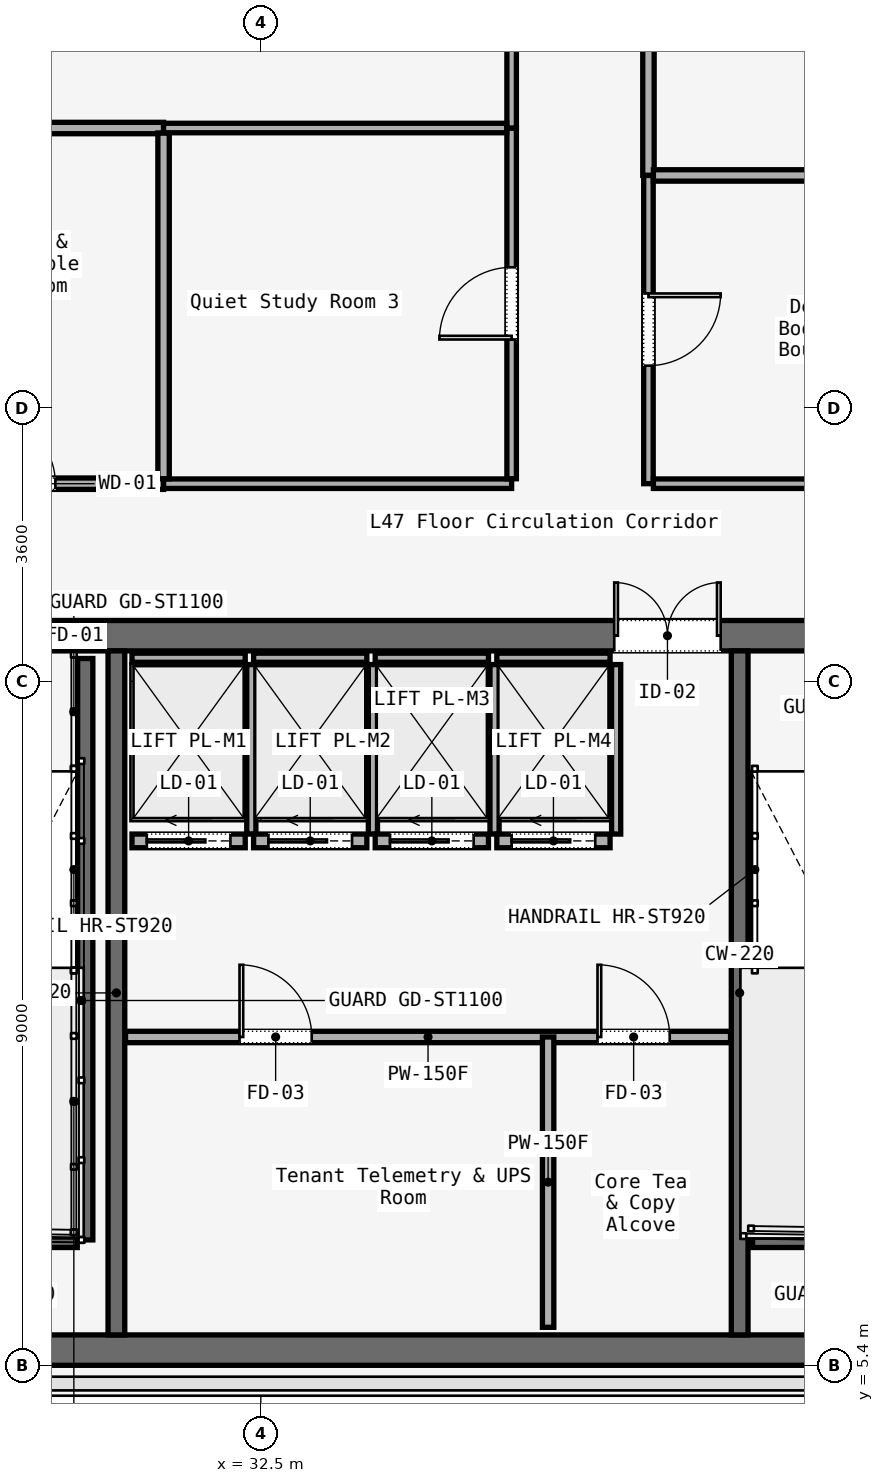
"""IFC4 building model, lengths in metres.
Left out: names, types, materials, properties, quantities, classifications, styles, units other than length and angle.
Written with IfcOpenShell. Run it as: python <this file> out.ifc"""

import sys

from ifc_helpers import new_model, si_unit, direction, frame, frame_2d, origin, place, context, subcontext, project, spatial, rectangle, extrude, element, fill, save


model = new_model("IFC4")
c1 = context("Model", 3, precision=1e-05, world=origin(), true_north=direction((0.0, 1.0)))
c2 = subcontext(c1, "Body", "Model", "MODEL_VIEW")
j1 = project(units=[si_unit("LENGTHUNIT", "METRE"), si_unit("PLANEANGLEUNIT", "RADIAN")], contexts=[c1])
p1 = place(None, origin())
s1 = spatial("IfcSite", under=j1, at=p1, CompositionType="ELEMENT")
p2 = place(p1, origin())
s2 = spatial("IfcBuilding", under=s1, at=p2, CompositionType="ELEMENT")
p3 = place(p2, frame((0.0, 0.0, 195.4)))
s3 = spatial("IfcBuildingStorey", under=s2, at=p3, CompositionType="ELEMENT", Elevation=195.4)
p4 = place(p3, frame((26.45, 15.0, 0.0), z_axis=(0.0, 0.0, 1.0), x_axis=(1.0, 0.0, 0.0)))
e1 = element("IfcWall", 1, at=p4, inside=s3, PredefinedType="SOLIDWALL", context=c2, shape_type="SweptSolid", body=[
    extrude(rectangle(XDim=31.1, YDim=0.4, at=frame_2d((15.55, 0.0))), origin(), (0.0, 0.0, 1.0), 3.58),
])
p5 = place(p4, frame((1.65, 0.0, 0.0)))
e2 = element("IfcOpeningElement", 2, at=p5, cuts=e1, PredefinedType="OPENING", context=c2, shape_type="SweptSolid", body=[
    extrude(rectangle(XDim=1.1, YDim=2.2, at=frame_2d((0.55, 1.1))), frame((0.0, 0.2, 0.0), z_axis=(0.0, -1.0, 0.0), x_axis=(1.0, 0.0, 0.0)), (0.0, 0.0, 1.0), 0.4),
])
p6 = place(p4, frame((13.65, 0.0, 0.0)))
e3 = element("IfcOpeningElement", 3, at=p6, cuts=e1, PredefinedType="OPENING", context=c2, shape_type="SweptSolid", body=[
    extrude(rectangle(XDim=1.1, YDim=2.2, at=frame_2d((0.55, 1.1))), frame((0.0, 0.2, 0.0), z_axis=(0.0, -1.0, 0.0), x_axis=(1.0, 0.0, 0.0)), (0.0, 0.0, 1.0), 0.4),
])
p7 = place(p4, frame((25.55, 0.0, 0.0)))
e4 = element("IfcOpeningElement", 4, at=p7, cuts=e1, PredefinedType="OPENING", context=c2, shape_type="SweptSolid", body=[
    extrude(rectangle(XDim=1.1, YDim=2.2, at=frame_2d((0.55, 1.1))), frame((0.0, 0.2, 0.0), z_axis=(0.0, -1.0, 0.0), x_axis=(1.0, 0.0, 0.0)), (0.0, 0.0, 1.0), 0.4),
])
p8 = place(p4, frame((10.7, 0.0, 0.0)))
e5 = element("IfcOpeningElement", 5, at=p8, cuts=e1, PredefinedType="OPENING", context=c2, shape_type="SweptSolid", body=[
    extrude(rectangle(XDim=1.4, YDim=2.2, at=frame_2d((0.7, 1.1))), frame((0.0, 0.2, 0.0), z_axis=(0.0, -1.0, 0.0), x_axis=(1.0, 0.0, 0.0)), (0.0, 0.0, 1.0), 0.4),
])
p9 = place(p4, frame((19.35, 0.0, 0.0)))
e6 = element("IfcOpeningElement", 6, at=p9, cuts=e1, PredefinedType="OPENING", context=c2, shape_type="SweptSolid", body=[
    extrude(rectangle(XDim=1.1, YDim=2.2, at=frame_2d((0.55, 1.1))), frame((0.0, 0.2, 0.0), z_axis=(0.0, -1.0, 0.0), x_axis=(1.0, 0.0, 0.0)), (0.0, 0.0, 1.0), 0.4),
])
p10 = place(p4, frame((21.4, 0.0, 0.0)))
e7 = element("IfcOpeningElement", 7, at=p10, cuts=e1, PredefinedType="OPENING", context=c2, shape_type="SweptSolid", body=[
    extrude(rectangle(XDim=0.9, YDim=2.1, at=frame_2d((0.45, 1.05))), frame((0.0, 0.2, 0.0), z_axis=(0.0, -1.0, 0.0), x_axis=(1.0, 0.0, 0.0)), (0.0, 0.0, 1.0), 0.4),
])
p11 = place(p4, frame((23.35, 0.0, 0.0)))
e8 = element("IfcOpeningElement", 8, at=p11, cuts=e1, PredefinedType="OPENING", context=c2, shape_type="SweptSolid", body=[
    extrude(rectangle(XDim=1.3, YDim=2.3, at=frame_2d((0.65, 1.15))), frame((0.0, 0.2, 0.0), z_axis=(0.0, -1.0, 0.0), x_axis=(1.0, 0.0, 0.0)), (0.0, 0.0, 1.0), 0.4),
])
p12 = place(p3, frame((26.45, 5.6, 0.0), z_axis=(0.0, 0.0, 1.0), x_axis=(1.0, 0.0, 0.0)))
e9 = element("IfcWall", 9, at=p12, inside=s3, PredefinedType="SOLIDWALL", context=c2, shape_type="SweptSolid", body=[
    extrude(rectangle(XDim=31.1, YDim=0.4, at=frame_2d((15.55, 0.0))), origin(), (0.0, 0.0, 1.0), 3.58),
])
for number, where, z_axis, x_axis in (
    (10, (30.6, 5.8, 0.0), (0.0, 0.0, 1.0), (0.0, 1.0, 0.0)),
    (11, (38.8, 5.8, 0.0), (0.0, 0.0, 1.0), (0.0, 1.0, 0.0)),
):
    element("IfcWall", number, at=place(p3, frame(where, z_axis=z_axis, x_axis=x_axis)), inside=s3, PredefinedType="SOLIDWALL", context=c2, shape_type="SweptSolid", body=[
        extrude(rectangle(XDim=9.0, YDim=0.22, at=frame_2d((4.5, 0.0))), origin(), (0.0, 0.0, 1.0), 3.58),
    ])
p13 = place(p3, frame((30.19, 14.7, 0.0), z_axis=(0.0, 0.0, 1.0), x_axis=(0.0, -1.0, 0.0)))
e12 = element("IfcWall", 12, at=p13, inside=s3, PredefinedType="SOLIDWALL", context=c2, shape_type="SweptSolid", body=[
    extrude(rectangle(XDim=7.65, YDim=0.2, at=frame_2d((3.825, 0.0))), origin(), (0.0, 0.0, 1.0), 3.8),
])
for number, where, z_axis, x_axis in (
    (13, (26.97, 7.05, 0.0), (0.0, 0.0, 1.0), (1.0, 0.0, 0.0)),
    (14, (38.97, 7.05, 0.0), (0.0, 0.0, 1.0), (1.0, 0.0, 0.0)),
):
    element("IfcWall", number, at=place(p3, frame(where, z_axis=z_axis, x_axis=x_axis)), inside=s3, PredefinedType="SOLIDWALL", context=c2, shape_type="SweptSolid", body=[
        extrude(rectangle(XDim=3.115, YDim=0.2, at=frame_2d((1.558, 0.0))), origin(), (0.0, 0.0, 1.0), 3.8),
    ])
p14 = place(p3, frame((30.72, 9.72, 0.0), z_axis=(0.0, 0.0, 1.0), x_axis=(1.0, 0.0, 0.0)))
e15 = element("IfcWall", 15, at=p14, inside=s3, PredefinedType="PARTITIONING", context=c2, shape_type="SweptSolid", body=[
    extrude(rectangle(XDim=7.96, YDim=0.15, at=frame_2d((3.98, 0.0))), origin(), (0.0, 0.0, 1.0), 3.01),
])
p15 = place(p14, frame((1.5, 0.0, 0.0)))
e16 = element("IfcOpeningElement", 16, at=p15, cuts=e15, PredefinedType="OPENING", context=c2, shape_type="SweptSolid", body=[
    extrude(rectangle(XDim=0.95, YDim=2.2, at=frame_2d((0.475, 1.1))), frame((0.0, 0.075, 0.0), z_axis=(0.0, -1.0, 0.0), x_axis=(1.0, 0.0, 0.0)), (0.0, 0.0, 1.0), 0.15),
])
p16 = place(p14, frame((6.21, 0.0, 0.0)))
e17 = element("IfcOpeningElement", 17, at=p16, cuts=e15, PredefinedType="OPENING", context=c2, shape_type="SweptSolid", body=[
    extrude(rectangle(XDim=0.95, YDim=2.2, at=frame_2d((0.475, 1.1))), frame((0.0, 0.075, 0.0), z_axis=(0.0, -1.0, 0.0), x_axis=(1.0, 0.0, 0.0)), (0.0, 0.0, 1.0), 0.15),
])
p17 = place(p3, frame((36.28, 5.9, 0.0), z_axis=(0.0, 0.0, 1.0), x_axis=(0.0, 1.0, 0.0)))
e18 = element("IfcWall", 18, at=p17, inside=s3, PredefinedType="PARTITIONING", context=c2, shape_type="SweptSolid", body=[
    extrude(rectangle(XDim=3.82, YDim=0.15, at=frame_2d((1.91, 0.0))), origin(), (0.0, 0.0, 1.0), 3.01),
])
p18 = place(p3, frame((30.805, 12.3, 0.0), z_axis=(0.0, 0.0, 1.0), x_axis=(1.0, 0.0, 0.0)))
e19 = element("IfcWall", 19, at=p18, inside=s3, PredefinedType="SOLIDWALL", context=c2, shape_type="SweptSolid", body=[
    extrude(rectangle(XDim=1.49, YDim=0.18, at=frame_2d((0.745, 0.0))), origin(), (0.0, 0.0, 1.0), 3.01),
])
p19 = place(p18, frame((0.195, 0.0, 0.0)))
e20 = element("IfcOpeningElement", 20, at=p19, cuts=e19, PredefinedType="OPENING", context=c2, shape_type="SweptSolid", body=[
    extrude(rectangle(XDim=1.1, YDim=2.2, at=frame_2d((0.55, 1.1))), frame((0.0, 0.09, 0.0), z_axis=(0.0, -1.0, 0.0), x_axis=(1.0, 0.0, 0.0)), (0.0, 0.0, 1.0), 0.18),
])
p20 = place(p3, frame((30.805, 14.71, 0.0), z_axis=(0.0, 0.0, 1.0), x_axis=(1.0, 0.0, 0.0)))
e21 = element("IfcWall", 21, at=p20, inside=s3, PredefinedType="SOLIDWALL", context=c2, shape_type="SweptSolid", body=[
    extrude(rectangle(XDim=1.49, YDim=0.12, at=frame_2d((0.745, 0.0))), origin(), (0.0, 0.0, 1.0), 3.01),
])
p21 = place(p3, frame((32.375, 12.39, 0.0), z_axis=(0.0, 0.0, 1.0), x_axis=(0.0, 1.0, 0.0)))
e22 = element("IfcWall", 22, at=p21, inside=s3, PredefinedType="SOLIDWALL", context=c2, shape_type="SweptSolid", body=[
    extrude(rectangle(XDim=2.23, YDim=0.12, at=frame_2d((1.115, 0.0))), origin(), (0.0, 0.0, 1.0), 3.01),
])
p22 = place(p3, frame((32.405, 12.3, 0.0), z_axis=(0.0, 0.0, 1.0), x_axis=(1.0, 0.0, 0.0)))
e23 = element("IfcWall", 23, at=p22, inside=s3, PredefinedType="SOLIDWALL", context=c2, shape_type="SweptSolid", body=[
    extrude(rectangle(XDim=1.49, YDim=0.18, at=frame_2d((0.745, 0.0))), origin(), (0.0, 0.0, 1.0), 3.01),
])
p23 = place(p22, frame((0.195, 0.0, 0.0)))
e24 = element("IfcOpeningElement", 24, at=p23, cuts=e23, PredefinedType="OPENING", context=c2, shape_type="SweptSolid", body=[
    extrude(rectangle(XDim=1.1, YDim=2.2, at=frame_2d((0.55, 1.1))), frame((0.0, 0.09, 0.0), z_axis=(0.0, -1.0, 0.0), x_axis=(1.0, 0.0, 0.0)), (0.0, 0.0, 1.0), 0.18),
])
p24 = place(p3, frame((32.405, 14.71, 0.0), z_axis=(0.0, 0.0, 1.0), x_axis=(1.0, 0.0, 0.0)))
e25 = element("IfcWall", 25, at=p24, inside=s3, PredefinedType="SOLIDWALL", context=c2, shape_type="SweptSolid", body=[
    extrude(rectangle(XDim=1.49, YDim=0.12, at=frame_2d((0.745, 0.0))), origin(), (0.0, 0.0, 1.0), 3.01),
])
p25 = place(p3, frame((33.975, 12.39, 0.0), z_axis=(0.0, 0.0, 1.0), x_axis=(0.0, 1.0, 0.0)))
e26 = element("IfcWall", 26, at=p25, inside=s3, PredefinedType="SOLIDWALL", context=c2, shape_type="SweptSolid", body=[
    extrude(rectangle(XDim=2.23, YDim=0.12, at=frame_2d((1.115, 0.0))), origin(), (0.0, 0.0, 1.0), 3.01),
])
p26 = place(p3, frame((34.005, 12.3, 0.0), z_axis=(0.0, 0.0, 1.0), x_axis=(1.0, 0.0, 0.0)))
e27 = element("IfcWall", 27, at=p26, inside=s3, PredefinedType="SOLIDWALL", context=c2, shape_type="SweptSolid", body=[
    extrude(rectangle(XDim=1.49, YDim=0.18, at=frame_2d((0.745, 0.0))), origin(), (0.0, 0.0, 1.0), 3.01),
])
p27 = place(p26, frame((0.195, 0.0, 0.0)))
e28 = element("IfcOpeningElement", 28, at=p27, cuts=e27, PredefinedType="OPENING", context=c2, shape_type="SweptSolid", body=[
    extrude(rectangle(XDim=1.1, YDim=2.2, at=frame_2d((0.55, 1.1))), frame((0.0, 0.09, 0.0), z_axis=(0.0, -1.0, 0.0), x_axis=(1.0, 0.0, 0.0)), (0.0, 0.0, 1.0), 0.18),
])
p28 = place(p3, frame((34.005, 14.71, 0.0), z_axis=(0.0, 0.0, 1.0), x_axis=(1.0, 0.0, 0.0)))
e29 = element("IfcWall", 29, at=p28, inside=s3, PredefinedType="SOLIDWALL", context=c2, shape_type="SweptSolid", body=[
    extrude(rectangle(XDim=1.49, YDim=0.12, at=frame_2d((0.745, 0.0))), origin(), (0.0, 0.0, 1.0), 3.01),
])
p29 = place(p3, frame((35.575, 12.39, 0.0), z_axis=(0.0, 0.0, 1.0), x_axis=(0.0, 1.0, 0.0)))
e30 = element("IfcWall", 30, at=p29, inside=s3, PredefinedType="SOLIDWALL", context=c2, shape_type="SweptSolid", body=[
    extrude(rectangle(XDim=2.23, YDim=0.12, at=frame_2d((1.115, 0.0))), origin(), (0.0, 0.0, 1.0), 3.01),
])
p30 = place(p3, frame((35.605, 12.3, 0.0), z_axis=(0.0, 0.0, 1.0), x_axis=(1.0, 0.0, 0.0)))
e31 = element("IfcWall", 31, at=p30, inside=s3, PredefinedType="SOLIDWALL", context=c2, shape_type="SweptSolid", body=[
    extrude(rectangle(XDim=1.49, YDim=0.18, at=frame_2d((0.745, 0.0))), origin(), (0.0, 0.0, 1.0), 3.01),
])
p31 = place(p30, frame((0.195, 0.0, 0.0)))
e32 = element("IfcOpeningElement", 32, at=p31, cuts=e31, PredefinedType="OPENING", context=c2, shape_type="SweptSolid", body=[
    extrude(rectangle(XDim=1.1, YDim=2.2, at=frame_2d((0.55, 1.1))), frame((0.0, 0.09, 0.0), z_axis=(0.0, -1.0, 0.0), x_axis=(1.0, 0.0, 0.0)), (0.0, 0.0, 1.0), 0.18),
])
p32 = place(p3, frame((35.605, 14.71, 0.0), z_axis=(0.0, 0.0, 1.0), x_axis=(1.0, 0.0, 0.0)))
e33 = element("IfcWall", 33, at=p32, inside=s3, PredefinedType="SOLIDWALL", context=c2, shape_type="SweptSolid", body=[
    extrude(rectangle(XDim=1.49, YDim=0.12, at=frame_2d((0.745, 0.0))), origin(), (0.0, 0.0, 1.0), 3.01),
])
p33 = place(p3, frame((37.175, 12.39, 0.0), z_axis=(0.0, 0.0, 1.0), x_axis=(0.0, 1.0, 0.0)))
e34 = element("IfcWall", 34, at=p33, inside=s3, PredefinedType="SOLIDWALL", context=c2, shape_type="SweptSolid", body=[
    extrude(rectangle(XDim=2.23, YDim=0.12, at=frame_2d((1.115, 0.0))), origin(), (0.0, 0.0, 1.0), 3.01),
])
p34 = place(p3, frame((27.474, 17.0, 0.0), z_axis=(0.0, 0.0, 1.0), x_axis=(1.0, 0.0, 0.0)))
e35 = element("IfcWall", 35, at=p34, inside=s3, PredefinedType="PARTITIONING", context=c2, shape_type="SweptSolid", body=[
    extrude(rectangle(XDim=3.747, YDim=0.15, at=frame_2d((1.874, 0.0))), origin(), (0.0, 0.0, 1.0), 3.01),
])
p35 = place(p34, frame((1.424, 0.0, 0.0)))
e36 = element("IfcOpeningElement", 36, at=p35, cuts=e35, PredefinedType="OPENING", context=c2, shape_type="SweptSolid", body=[
    extrude(rectangle(XDim=0.9, YDim=2.15, at=frame_2d((0.45, 1.075))), frame((0.0, 0.075, 0.0), z_axis=(0.0, -1.0, 0.0), x_axis=(1.0, 0.0, 0.0)), (0.0, 0.0, 1.0), 0.15),
])
p36 = place(p3, frame((31.22, 17.0, 0.0), z_axis=(0.0, 0.0, 1.0), x_axis=(1.0, 0.0, 0.0)))
e37 = element("IfcWall", 37, at=p36, inside=s3, PredefinedType="PARTITIONING", context=c2, shape_type="SweptSolid", body=[
    extrude(rectangle(XDim=4.58, YDim=0.125, at=frame_2d((2.29, 0.0))), origin(), (0.0, 0.0, 1.0), 3.01),
])
p37 = place(p3, frame((35.8, 17.065, 0.0), z_axis=(0.0, 0.0, 1.0), x_axis=(0.0, 1.0, 0.0)))
e38 = element("IfcWall", 38, at=p37, inside=s3, PredefinedType="PARTITIONING", context=c2, shape_type="SweptSolid", body=[
    extrude(rectangle(XDim=4.615, YDim=0.125, at=frame_2d((2.308, 0.0))), origin(), (0.0, 0.0, 1.0), 3.01),
])
p38 = place(p37, frame((1.833, 0.0, 0.0)))
e39 = element("IfcOpeningElement", 39, at=p38, cuts=e38, PredefinedType="OPENING", context=c2, shape_type="SweptSolid", body=[
    extrude(rectangle(XDim=0.95, YDim=2.2, at=frame_2d((0.475, 1.1))), frame((0.0, 0.062, 0.0), z_axis=(0.0, -1.0, 0.0), x_axis=(1.0, 0.0, 0.0)), (0.0, 0.0, 1.0), 0.125),
])
p39 = place(p3, frame((35.8, 21.68, 0.0), z_axis=(0.0, 0.0, 1.0), x_axis=(0.0, 1.0, 0.0)))
e40 = element("IfcWall", 40, at=p39, inside=s3, PredefinedType="PARTITIONING", context=c2, shape_type="SweptSolid", body=[
    extrude(rectangle(XDim=2.403, YDim=0.125, at=frame_2d((1.201, 0.0))), origin(), (0.0, 0.0, 1.0), 3.01),
])
p40 = place(p3, frame((37.6, 27.335, 0.0), z_axis=(0.0, 0.0, 1.0), x_axis=(0.0, -1.0, 0.0)))
e41 = element("IfcWall", 41, at=p40, inside=s3, PredefinedType="PARTITIONING", context=c2, shape_type="SweptSolid", body=[
    extrude(rectangle(XDim=6.279, YDim=0.15, at=frame_2d((3.14, 0.0))), origin(), (0.0, 0.0, 1.0), 3.01),
])
p41 = place(p40, frame((2.665, 0.0, 0.0)))
e42 = element("IfcOpeningElement", 42, at=p41, cuts=e41, PredefinedType="OPENING", context=c2, shape_type="SweptSolid", body=[
    extrude(rectangle(XDim=0.95, YDim=2.2, at=frame_2d((0.475, 1.1))), frame((0.0, 0.075, 0.0), z_axis=(0.0, -1.0, 0.0), x_axis=(1.0, 0.0, 0.0)), (0.0, 0.0, 1.0), 0.15),
])
p42 = place(p3, frame((37.6, 21.056, 0.0), z_axis=(0.0, 0.0, 1.0), x_axis=(0.0, -1.0, 0.0)))
e43 = element("IfcWall", 43, at=p42, inside=s3, PredefinedType="PARTITIONING", context=c2, shape_type="SweptSolid", body=[
    extrude(rectangle(XDim=4.056, YDim=0.125, at=frame_2d((2.028, 0.0))), origin(), (0.0, 0.0, 1.0), 3.01),
])
p43 = place(p42, frame((1.553, 0.0, 0.0)))
e44 = element("IfcOpeningElement", 44, at=p43, cuts=e43, PredefinedType="OPENING", context=c2, shape_type="SweptSolid", body=[
    extrude(rectangle(XDim=0.95, YDim=2.2, at=frame_2d((0.475, 1.1))), frame((0.0, 0.062, 0.0), z_axis=(0.0, -1.0, 0.0), x_axis=(1.0, 0.0, 0.0)), (0.0, 0.0, 1.0), 0.125),
])
p44 = place(p3, frame((37.665, 17.0, 0.0), z_axis=(0.0, 0.0, 1.0), x_axis=(1.0, 0.0, 0.0)))
e45 = element("IfcWall", 45, at=p44, inside=s3, PredefinedType="PARTITIONING", context=c2, shape_type="SweptSolid", body=[
    extrude(rectangle(XDim=3.445, YDim=0.125, at=frame_2d((1.723, 0.0))), origin(), (0.0, 0.0, 1.0), 3.01),
])
p45 = place(p3, frame((37.665, 21.056, 0.0), z_axis=(0.0, 0.0, 1.0), x_axis=(1.0, 0.0, 0.0)))
e46 = element("IfcWall", 46, at=p45, inside=s3, PredefinedType="PARTITIONING", context=c2, shape_type="SweptSolid", body=[
    extrude(rectangle(XDim=3.38, YDim=0.15, at=frame_2d((1.69, 0.0))), origin(), (0.0, 0.0, 1.0), 3.01),
])
p46 = place(p3, frame((27.539, 21.68, 0.0), z_axis=(0.0, 0.0, 1.0), x_axis=(1.0, 0.0, 0.0)))
e47 = element("IfcWall", 47, at=p46, inside=s3, PredefinedType="PARTITIONING", context=c2, shape_type="SweptSolid", body=[
    extrude(rectangle(XDim=3.682, YDim=0.15, at=frame_2d((1.841, 0.0))), origin(), (0.0, 0.0, 1.0), 3.01),
])
p47 = place(p3, frame((31.22, 21.615, 0.0), z_axis=(0.0, 0.0, 1.0), x_axis=(0.0, -1.0, 0.0)))
e48 = element("IfcWall", 48, at=p47, inside=s3, PredefinedType="PARTITIONING", context=c2, shape_type="SweptSolid", body=[
    extrude(rectangle(XDim=4.55, YDim=0.15, at=frame_2d((2.275, 0.0))), origin(), (0.0, 0.0, 1.0), 3.01),
])
p48 = place(p3, frame((31.22, 21.68, 0.0), z_axis=(0.0, 0.0, 1.0), x_axis=(1.0, 0.0, 0.0)))
e49 = element("IfcWall", 49, at=p48, inside=s3, PredefinedType="PARTITIONING", context=c2, shape_type="SweptSolid", body=[
    extrude(rectangle(XDim=4.515, YDim=0.125, at=frame_2d((2.257, 0.0))), origin(), (0.0, 0.0, 1.0), 3.01),
])
p49 = place(p8, origin())
e50 = element("IfcDoor", 50, at=p49, inside=s3, OperationType="DOUBLE_DOOR_SINGLE_SWING", PredefinedType="DOOR", context=c2, shape_type="SweptSolid", body=[
    extrude(rectangle(XDim=1.4, YDim=2.2, at=frame_2d((0.7, 1.1))), frame((0.0, 0.025, 0.0), z_axis=(0.0, -1.0, 0.0), x_axis=(1.0, 0.0, 0.0)), (0.0, 0.0, 1.0), 0.05),
])
fill(e5, e50)
p50 = place(p15, origin())
e51 = element("IfcDoor", 51, at=p50, inside=s3, OperationType="SINGLE_SWING_LEFT", PredefinedType="DOOR", context=c2, shape_type="SweptSolid", body=[
    extrude(rectangle(XDim=0.95, YDim=2.2, at=frame_2d((0.475, 1.1))), frame((0.0, 0.025, 0.0), z_axis=(0.0, -1.0, 0.0), x_axis=(1.0, 0.0, 0.0)), (0.0, 0.0, 1.0), 0.05),
])
fill(e16, e51)
p51 = place(p16, origin())
e52 = element("IfcDoor", 52, at=p51, inside=s3, OperationType="SINGLE_SWING_RIGHT", PredefinedType="DOOR", context=c2, shape_type="SweptSolid", body=[
    extrude(rectangle(XDim=0.95, YDim=2.2, at=frame_2d((0.475, 1.1))), frame((0.0, 0.025, 0.0), z_axis=(0.0, -1.0, 0.0), x_axis=(1.0, 0.0, 0.0)), (0.0, 0.0, 1.0), 0.05),
])
fill(e17, e52)
p52 = place(p19, origin())
e53 = element("IfcDoor", 53, at=p52, inside=s3, OperationType="SLIDING_TO_LEFT", PredefinedType="DOOR", context=c2, shape_type="SweptSolid", body=[
    extrude(rectangle(XDim=1.1, YDim=2.2, at=frame_2d((0.55, 1.1))), frame((0.0, 0.025, 0.0), z_axis=(0.0, -1.0, 0.0), x_axis=(1.0, 0.0, 0.0)), (0.0, 0.0, 1.0), 0.05),
])
fill(e20, e53)
p53 = place(p23, origin())
e54 = element("IfcDoor", 54, at=p53, inside=s3, OperationType="SLIDING_TO_LEFT", PredefinedType="DOOR", context=c2, shape_type="SweptSolid", body=[
    extrude(rectangle(XDim=1.1, YDim=2.2, at=frame_2d((0.55, 1.1))), frame((0.0, 0.025, 0.0), z_axis=(0.0, -1.0, 0.0), x_axis=(1.0, 0.0, 0.0)), (0.0, 0.0, 1.0), 0.05),
])
fill(e24, e54)
p54 = place(p27, origin())
e55 = element("IfcDoor", 55, at=p54, inside=s3, OperationType="SLIDING_TO_LEFT", PredefinedType="DOOR", context=c2, shape_type="SweptSolid", body=[
    extrude(rectangle(XDim=1.1, YDim=2.2, at=frame_2d((0.55, 1.1))), frame((0.0, 0.025, 0.0), z_axis=(0.0, -1.0, 0.0), x_axis=(1.0, 0.0, 0.0)), (0.0, 0.0, 1.0), 0.05),
])
fill(e28, e55)
p55 = place(p31, origin())
e56 = element("IfcDoor", 56, at=p55, inside=s3, OperationType="SLIDING_TO_LEFT", PredefinedType="DOOR", context=c2, shape_type="SweptSolid", body=[
    extrude(rectangle(XDim=1.1, YDim=2.2, at=frame_2d((0.55, 1.1))), frame((0.0, 0.025, 0.0), z_axis=(0.0, -1.0, 0.0), x_axis=(1.0, 0.0, 0.0)), (0.0, 0.0, 1.0), 0.05),
])
fill(e32, e56)
p56 = place(p43, origin())
e57 = element("IfcDoor", 57, at=p56, inside=s3, OperationType="SINGLE_SWING_RIGHT", PredefinedType="DOOR", context=c2, shape_type="SweptSolid", body=[
    extrude(rectangle(XDim=0.95, YDim=2.2, at=frame_2d((0.475, 1.1))), frame((0.0, 0.025, 0.0), z_axis=(0.0, -1.0, 0.0), x_axis=(1.0, 0.0, 0.0)), (0.0, 0.0, 1.0), 0.05),
])
fill(e44, e57)
p57 = place(p35, origin())
e58 = element("IfcDoor", 58, at=p57, inside=s3, OperationType="SINGLE_SWING_RIGHT", PredefinedType="DOOR", context=c2, shape_type="SweptSolid", body=[
    extrude(rectangle(XDim=0.9, YDim=2.15, at=frame_2d((0.45, 1.075))), frame((0.0, 0.025, 0.0), z_axis=(0.0, -1.0, 0.0), x_axis=(1.0, 0.0, 0.0)), (0.0, 0.0, 1.0), 0.05),
])
fill(e36, e58)
p58 = place(p38, origin())
e59 = element("IfcDoor", 59, at=p58, inside=s3, OperationType="SINGLE_SWING_LEFT", PredefinedType="DOOR", context=c2, shape_type="SweptSolid", body=[
    extrude(rectangle(XDim=0.95, YDim=2.2, at=frame_2d((0.475, 1.1))), frame((0.0, 0.025, 0.0), z_axis=(0.0, -1.0, 0.0), x_axis=(1.0, 0.0, 0.0)), (0.0, 0.0, 1.0), 0.05),
])
fill(e39, e59)
save(model, sys.argv[1])
